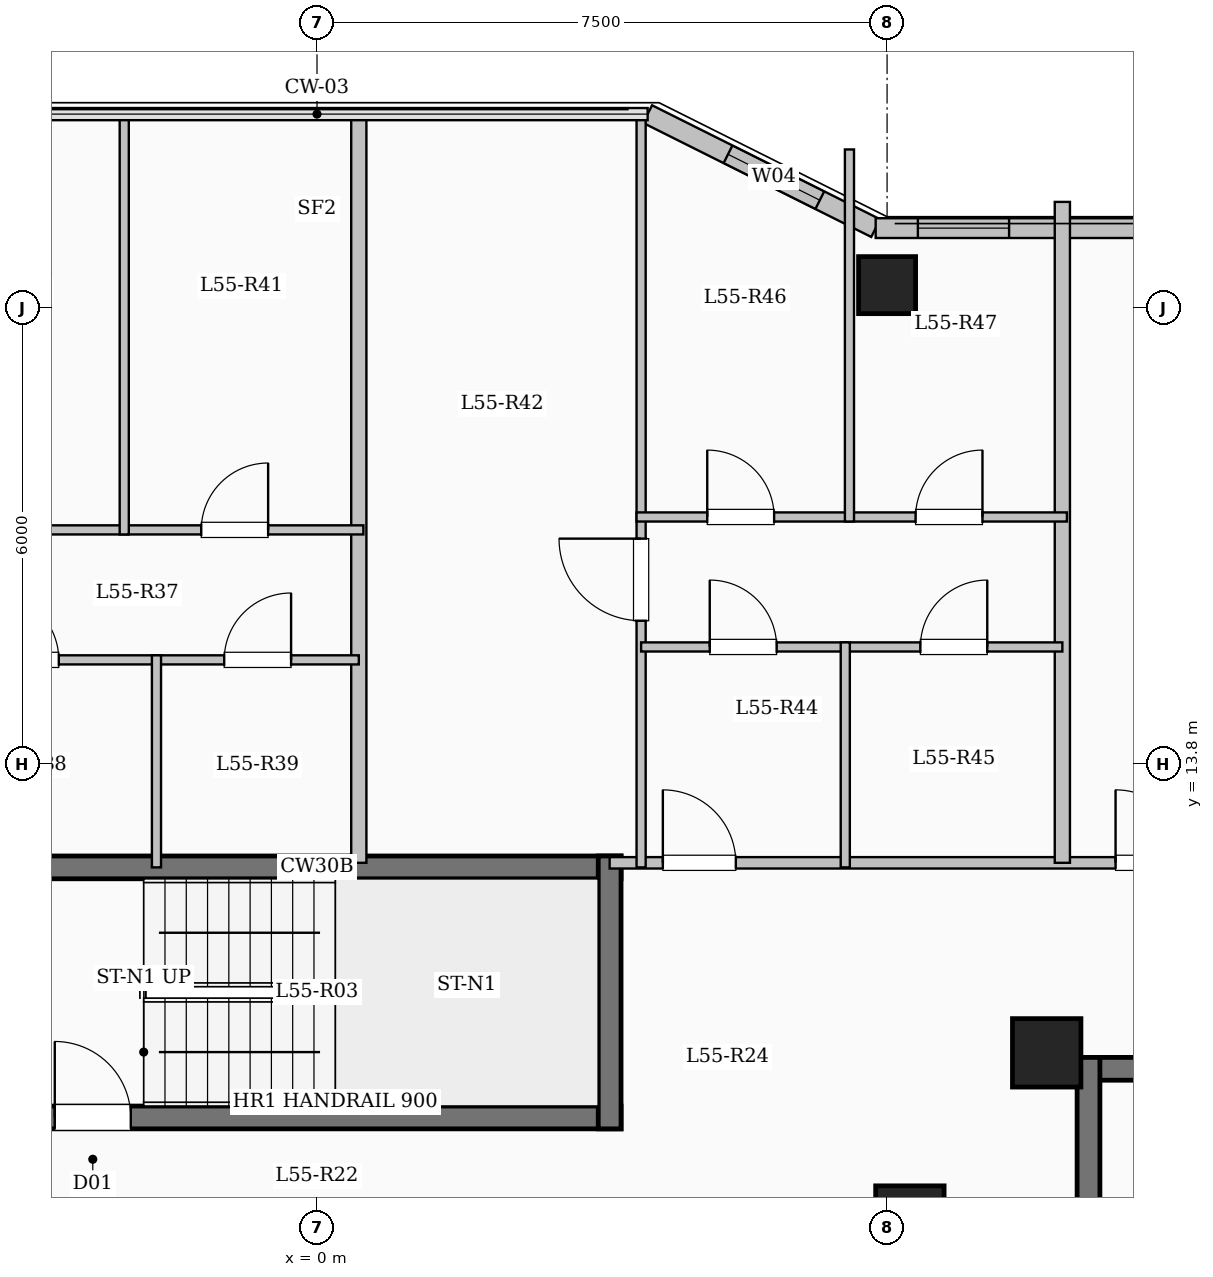
"""IFC4 building model, lengths in metres.
Left out: names, types, materials, properties, quantities, classifications, styles, units other than length and angle.
Written with IfcOpenShell. Run it as: python <this file> out.ifc"""

import sys

from ifc_helpers import new_model, si_unit, direction, frame, frame_2d, origin, origin_2d, place, context, subcontext, project, spatial, rectangle, extrude, element, fill, save


model = new_model("IFC4")
c1 = context("Model", 3, precision=1e-05, world=origin(), true_north=direction((0.0, 1.0)))
c2 = subcontext(c1, "Body", "Model", "MODEL_VIEW")
j1 = project(units=[si_unit("LENGTHUNIT", "METRE"), si_unit("PLANEANGLEUNIT", "RADIAN")], contexts=[c1])
p1 = place(None, origin())
s1 = spatial("IfcSite", under=j1, at=p1, CompositionType="ELEMENT")
p2 = place(p1, origin())
s2 = spatial("IfcBuilding", under=s1, at=p2, CompositionType="ELEMENT")
p3 = place(p2, frame((0.0, 0.0, 203.65)))
s3 = spatial("IfcBuildingStorey", under=s2, at=p3, CompositionType="ELEMENT", Elevation=203.65)
for number, where, z_axis, x_axis in (
    (1, (7.8, 7.8, 0.0), (0.0, 0.0, 1.0), (1.0, 0.0, 0.0)),
    (2, (9.6, 10.0, 0.0), (0.0, 0.0, 1.0), (1.0, 0.0, 0.0)),
):
    element("IfcColumn", number, at=place(p3, frame(where, z_axis=z_axis, x_axis=x_axis)), inside=s3, PredefinedType="COLUMN", context=c2, shape_type="SweptSolid", body=[
        extrude(rectangle(XDim=0.9, YDim=0.9, at=origin_2d()), origin(), (0.0, 0.0, 1.0), 3.35),
    ])
p4 = place(p3, frame((7.5, 20.1, 0.0), z_axis=(0.0, 0.0, 1.0), x_axis=(1.0, 0.0, 0.0)))
e3 = element("IfcColumn", 3, at=p4, inside=s3, PredefinedType="COLUMN", context=c2, shape_type="SweptSolid", body=[
    extrude(rectangle(XDim=0.75, YDim=0.75, at=origin_2d()), origin(), (0.0, 0.0, 1.0), 3.35),
])
p5 = place(p3, frame((4.35, 22.35, 0.0), z_axis=(0.0, 0.0, 1.0), x_axis=(0.894427191, -0.4472135955, 0.0)))
e4 = element("IfcWall", 4, at=p5, inside=s3, PredefinedType="SOLIDWALL", context=c2, shape_type="SweptSolid", body=[
    extrude(rectangle(XDim=3.354, YDim=0.26, at=frame_2d((1.677, 0.0))), origin(), (0.0, 0.0, 1.0), 3.1),
])
p6 = place(p5, frame((1.182, 0.0, 0.95)))
e5 = element("IfcOpeningElement", 5, at=p6, cuts=e4, PredefinedType="OPENING", context=c2, shape_type="SweptSolid", body=[
    extrude(rectangle(XDim=1.35, YDim=1.55, at=frame_2d((0.675, 0.775))), frame((0.0, 0.14, 0.0), z_axis=(0.0, -1.0, 0.0), x_axis=(1.0, 0.0, 0.0)), (0.0, 0.0, 1.0), 0.28),
])
p7 = place(p3, frame((7.35, 20.85, 0.0), z_axis=(0.0, 0.0, 1.0), x_axis=(1.0, 0.0, 0.0)))
e6 = element("IfcWall", 6, at=p7, inside=s3, PredefinedType="SOLIDWALL", context=c2, shape_type="SweptSolid", body=[
    extrude(rectangle(XDim=11.1, YDim=0.26, at=frame_2d((5.55, 0.0))), origin(), (0.0, 0.0, 1.0), 3.1),
])
p8 = place(p7, frame((0.555, 0.0, 0.95)))
e7 = element("IfcOpeningElement", 7, at=p8, cuts=e6, PredefinedType="OPENING", context=c2, shape_type="SweptSolid", body=[
    extrude(rectangle(XDim=1.2, YDim=1.5, at=frame_2d((0.6, 0.75))), frame((0.0, 0.14, 0.0), z_axis=(0.0, -1.0, 0.0), x_axis=(1.0, 0.0, 0.0)), (0.0, 0.0, 1.0), 0.28),
])
p9 = place(p7, frame((3.471, 0.0, 0.9)))
e8 = element("IfcOpeningElement", 8, at=p9, cuts=e6, PredefinedType="OPENING", context=c2, shape_type="SweptSolid", body=[
    extrude(rectangle(XDim=2.2, YDim=1.75, at=frame_2d((1.1, 0.875))), frame((0.0, 0.14, 0.0), z_axis=(0.0, -1.0, 0.0), x_axis=(1.0, 0.0, 0.0)), (0.0, 0.0, 1.0), 0.28),
])
p10 = place(p7, frame((8.04, 0.0, 0.9)))
e9 = element("IfcOpeningElement", 9, at=p10, cuts=e6, PredefinedType="OPENING", context=c2, shape_type="SweptSolid", body=[
    extrude(rectangle(XDim=1.65, YDim=1.6, at=frame_2d((0.825, 0.8))), frame((0.0, 0.14, 0.0), z_axis=(0.0, -1.0, 0.0), x_axis=(1.0, 0.0, 0.0)), (0.0, 0.0, 1.0), 0.28),
])
p11 = place(p3, frame((10.0, 9.79, 0.0), z_axis=(0.0, 0.0, 1.0), x_axis=(1.0, 0.0, 0.0)))
e10 = element("IfcWall", 10, at=p11, inside=s3, PredefinedType="SHEAR", context=c2, shape_type="SweptSolid", body=[
    extrude(rectangle(XDim=8.0, YDim=0.3, at=frame_2d((4.0, 0.0))), origin(), (0.0, 0.0, 1.0), 3.35),
])
p12 = place(p3, frame((10.15, 6.35, 0.0), z_axis=(0.0, 0.0, 1.0), x_axis=(0.0, 1.0, 0.0)))
e11 = element("IfcWall", 11, at=p12, inside=s3, PredefinedType="SHEAR", context=c2, shape_type="SweptSolid", body=[
    extrude(rectangle(XDim=3.59, YDim=0.3, at=frame_2d((1.795, 0.0))), origin(), (0.0, 0.0, 1.0), 3.35),
])
p13 = place(p3, frame((-4.0, 12.44, 0.0), z_axis=(0.0, 0.0, 1.0), x_axis=(1.0, 0.0, 0.0)))
e12 = element("IfcWall", 12, at=p13, inside=s3, PredefinedType="SHEAR", context=c2, shape_type="SweptSolid", body=[
    extrude(rectangle(XDim=8.0, YDim=0.3, at=frame_2d((4.0, 0.0))), origin(), (0.0, 0.0, 1.0), 3.35),
])
p14 = place(p3, frame((-4.0, 9.15, 0.0), z_axis=(0.0, 0.0, 1.0), x_axis=(1.0, 0.0, 0.0)))
e13 = element("IfcWall", 13, at=p14, inside=s3, PredefinedType="SHEAR", context=c2, shape_type="SweptSolid", body=[
    extrude(rectangle(XDim=8.0, YDim=0.3, at=frame_2d((4.0, 0.0))), origin(), (0.0, 0.0, 1.0), 3.35),
])
p15 = place(p14, frame((0.55, 0.0, 0.0)))
e14 = element("IfcOpeningElement", 14, at=p15, cuts=e13, PredefinedType="OPENING", context=c2, shape_type="SweptSolid", body=[
    extrude(rectangle(XDim=1.0, YDim=2.15, at=frame_2d((0.5, 1.075))), frame((0.0, 0.16, 0.0), z_axis=(0.0, -1.0, 0.0), x_axis=(1.0, 0.0, 0.0)), (0.0, 0.0, 1.0), 0.32),
])
p16 = place(p3, frame((3.85, 9.0, 0.0), z_axis=(0.0, 0.0, 1.0), x_axis=(0.0, 1.0, 0.0)))
e15 = element("IfcWall", 15, at=p16, inside=s3, PredefinedType="SHEAR", context=c2, shape_type="SweptSolid", body=[
    extrude(rectangle(XDim=3.59, YDim=0.3, at=frame_2d((1.795, 0.0))), origin(), (0.0, 0.0, 1.0), 3.35),
])
p17 = place(p3, frame((3.85, 12.5, 0.0), z_axis=(0.0, 0.0, 1.0), x_axis=(1.0, 0.0, 0.0)))
e16 = element("IfcWall", 16, at=p17, inside=s3, PredefinedType="PARTITIONING", context=c2, shape_type="SweptSolid", body=[
    extrude(rectangle(XDim=14.5, YDim=0.15, at=frame_2d((7.25, 0.0))), origin(), (0.0, 0.0, 1.0), 3.1),
])
p18 = place(p17, frame((0.7, 0.0, 0.0)))
e17 = element("IfcOpeningElement", 17, at=p18, cuts=e16, PredefinedType="OPENING", context=c2, shape_type="SweptSolid", body=[
    extrude(rectangle(XDim=0.96, YDim=2.15, at=frame_2d((0.48, 1.075))), frame((0.0, 0.085, 0.0), z_axis=(0.0, -1.0, 0.0), x_axis=(1.0, 0.0, 0.0)), (0.0, 0.0, 1.0), 0.17),
])
p19 = place(p17, frame((6.656, 0.0, 0.0)))
e18 = element("IfcOpeningElement", 18, at=p19, cuts=e16, PredefinedType="OPENING", context=c2, shape_type="SweptSolid", body=[
    extrude(rectangle(XDim=0.96, YDim=2.15, at=frame_2d((0.48, 1.075))), frame((0.0, 0.085, 0.0), z_axis=(0.0, -1.0, 0.0), x_axis=(1.0, 0.0, 0.0)), (0.0, 0.0, 1.0), 0.17),
])
p20 = place(p3, frame((0.55, 12.5, 0.0), z_axis=(0.0, 0.0, 1.0), x_axis=(0.0, 1.0, 0.0)))
e19 = element("IfcWall", 19, at=p20, inside=s3, PredefinedType="SOLIDWALL", context=c2, shape_type="SweptSolid", body=[
    extrude(rectangle(XDim=9.88, YDim=0.2, at=frame_2d((4.94, 0.0))), origin(), (0.0, 0.0, 1.0), 3.1),
])
p21 = place(p3, frame((-5.562, 15.17, 0.0), z_axis=(0.0, 0.0, 1.0), x_axis=(1.0, 0.0, 0.0)))
e20 = element("IfcWall", 20, at=p21, inside=s3, PredefinedType="PARTITIONING", context=c2, shape_type="SweptSolid", body=[
    extrude(rectangle(XDim=3.45, YDim=0.12, at=frame_2d((1.725, 0.0))), origin(), (0.0, 0.0, 1.0), 3.1),
])
p22 = place(p21, frame((1.285, 0.0, 0.0)))
e21 = element("IfcOpeningElement", 21, at=p22, cuts=e20, PredefinedType="OPENING", context=c2, shape_type="SweptSolid", body=[
    extrude(rectangle(XDim=0.88, YDim=2.1, at=frame_2d((0.44, 1.05))), frame((0.0, 0.07, 0.0), z_axis=(0.0, -1.0, 0.0), x_axis=(1.0, 0.0, 0.0)), (0.0, 0.0, 1.0), 0.14),
])
p23 = place(p3, frame((-2.112, 15.17, 0.0), z_axis=(0.0, 0.0, 1.0), x_axis=(1.0, 0.0, 0.0)))
e22 = element("IfcWall", 22, at=p23, inside=s3, PredefinedType="PARTITIONING", context=c2, shape_type="SweptSolid", body=[
    extrude(rectangle(XDim=2.662, YDim=0.12, at=frame_2d((1.331, 0.0))), origin(), (0.0, 0.0, 1.0), 3.1),
])
p24 = place(p23, frame((0.891, 0.0, 0.0)))
e23 = element("IfcOpeningElement", 23, at=p24, cuts=e22, PredefinedType="OPENING", context=c2, shape_type="SweptSolid", body=[
    extrude(rectangle(XDim=0.88, YDim=2.1, at=frame_2d((0.44, 1.05))), frame((0.0, 0.07, 0.0), z_axis=(0.0, -1.0, 0.0), x_axis=(1.0, 0.0, 0.0)), (0.0, 0.0, 1.0), 0.14),
])
p25 = place(p3, frame((-5.622, 16.88, 0.0), z_axis=(0.0, 0.0, 1.0), x_axis=(1.0, 0.0, 0.0)))
e24 = element("IfcWall", 24, at=p25, inside=s3, PredefinedType="PARTITIONING", context=c2, shape_type="SweptSolid", body=[
    extrude(rectangle(XDim=6.232, YDim=0.12, at=frame_2d((3.116, 0.0))), origin(), (0.0, 0.0, 1.0), 2.725),
])
p26 = place(p25, frame((1.073, 0.0, 0.0)))
e25 = element("IfcOpeningElement", 25, at=p26, cuts=e24, PredefinedType="OPENING", context=c2, shape_type="SweptSolid", body=[
    extrude(rectangle(XDim=0.88, YDim=2.1, at=frame_2d((0.44, 1.05))), frame((0.0, 0.07, 0.0), z_axis=(0.0, -1.0, 0.0), x_axis=(1.0, 0.0, 0.0)), (0.0, 0.0, 1.0), 0.14),
])
p27 = place(p25, frame((4.099, 0.0, 0.0)))
e26 = element("IfcOpeningElement", 26, at=p27, cuts=e24, PredefinedType="OPENING", context=c2, shape_type="SweptSolid", body=[
    extrude(rectangle(XDim=0.88, YDim=2.1, at=frame_2d((0.44, 1.05))), frame((0.0, 0.07, 0.0), z_axis=(0.0, -1.0, 0.0), x_axis=(1.0, 0.0, 0.0)), (0.0, 0.0, 1.0), 0.14),
])
p28 = place(p3, frame((-2.112, 12.44, 0.0), z_axis=(0.0, 0.0, 1.0), x_axis=(0.0, 1.0, 0.0)))
e27 = element("IfcWall", 27, at=p28, inside=s3, PredefinedType="PARTITIONING", context=c2, shape_type="SweptSolid", body=[
    extrude(rectangle(XDim=2.79, YDim=0.12, at=frame_2d((1.395, 0.0))), origin(), (0.0, 0.0, 1.0), 3.1),
])
p29 = place(p3, frame((-2.536, 16.82, 0.0), z_axis=(0.0, 0.0, 1.0), x_axis=(0.0, 1.0, 0.0)))
e28 = element("IfcWall", 28, at=p29, inside=s3, PredefinedType="PARTITIONING", context=c2, shape_type="SweptSolid", body=[
    extrude(rectangle(XDim=5.56, YDim=0.12, at=frame_2d((2.78, 0.0))), origin(), (0.0, 0.0, 1.0), 3.1),
])
p30 = place(p3, frame((9.806, 12.5, 0.0), z_axis=(0.0, 0.0, 1.0), x_axis=(0.0, 1.0, 0.0)))
e29 = element("IfcWall", 29, at=p30, inside=s3, PredefinedType="SOLIDWALL", context=c2, shape_type="SweptSolid", body=[
    extrude(rectangle(XDim=8.695, YDim=0.2, at=frame_2d((4.348, 0.0))), origin(), (0.0, 0.0, 1.0), 3.1),
])
p31 = place(p3, frame((4.264, 12.44, 0.0), z_axis=(0.0, 0.0, 1.0), x_axis=(0.0, 1.0, 0.0)))
e30 = element("IfcWall", 30, at=p31, inside=s3, PredefinedType="PARTITIONING", context=c2, shape_type="SweptSolid", body=[
    extrude(rectangle(XDim=9.94, YDim=0.12, at=frame_2d((4.97, 0.0))), origin(), (0.0, 0.0, 1.0), 3.1),
])
p32 = place(p31, frame((3.245, 0.0, 0.0)))
e31 = element("IfcOpeningElement", 31, at=p32, cuts=e30, PredefinedType="OPENING", context=c2, shape_type="SweptSolid", body=[
    extrude(rectangle(XDim=1.08, YDim=2.15, at=frame_2d((0.54, 1.075))), frame((0.0, 0.07, 0.0), z_axis=(0.0, -1.0, 0.0), x_axis=(1.0, 0.0, 0.0)), (0.0, 0.0, 1.0), 0.14),
])
p33 = place(p3, frame((4.264, 15.34, 0.0), z_axis=(0.0, 0.0, 1.0), x_axis=(1.0, 0.0, 0.0)))
e32 = element("IfcWall", 32, at=p33, inside=s3, PredefinedType="PARTITIONING", context=c2, shape_type="SweptSolid", body=[
    extrude(rectangle(XDim=2.686, YDim=0.12, at=frame_2d((1.343, 0.0))), origin(), (0.0, 0.0, 1.0), 2.725),
])
p34 = place(p33, frame((0.903, 0.0, 0.0)))
e33 = element("IfcOpeningElement", 33, at=p34, cuts=e32, PredefinedType="OPENING", context=c2, shape_type="SweptSolid", body=[
    extrude(rectangle(XDim=0.88, YDim=2.1, at=frame_2d((0.44, 1.05))), frame((0.0, 0.07, 0.0), z_axis=(0.0, -1.0, 0.0), x_axis=(1.0, 0.0, 0.0)), (0.0, 0.0, 1.0), 0.14),
])
p35 = place(p3, frame((6.95, 15.34, 0.0), z_axis=(0.0, 0.0, 1.0), x_axis=(1.0, 0.0, 0.0)))
e34 = element("IfcWall", 34, at=p35, inside=s3, PredefinedType="PARTITIONING", context=c2, shape_type="SweptSolid", body=[
    extrude(rectangle(XDim=2.856, YDim=0.12, at=frame_2d((1.428, 0.0))), origin(), (0.0, 0.0, 1.0), 2.725),
])
p36 = place(p35, frame((0.988, 0.0, 0.0)))
e35 = element("IfcOpeningElement", 35, at=p36, cuts=e34, PredefinedType="OPENING", context=c2, shape_type="SweptSolid", body=[
    extrude(rectangle(XDim=0.88, YDim=2.1, at=frame_2d((0.44, 1.05))), frame((0.0, 0.07, 0.0), z_axis=(0.0, -1.0, 0.0), x_axis=(1.0, 0.0, 0.0)), (0.0, 0.0, 1.0), 0.14),
])
p37 = place(p3, frame((4.204, 17.05, 0.0), z_axis=(0.0, 0.0, 1.0), x_axis=(1.0, 0.0, 0.0)))
e36 = element("IfcWall", 36, at=p37, inside=s3, PredefinedType="PARTITIONING", context=c2, shape_type="SweptSolid", body=[
    extrude(rectangle(XDim=5.662, YDim=0.12, at=frame_2d((2.831, 0.0))), origin(), (0.0, 0.0, 1.0), 2.725),
])
p38 = place(p37, frame((0.93, 0.0, 0.0)))
e37 = element("IfcOpeningElement", 37, at=p38, cuts=e36, PredefinedType="OPENING", context=c2, shape_type="SweptSolid", body=[
    extrude(rectangle(XDim=0.88, YDim=2.1, at=frame_2d((0.44, 1.05))), frame((0.0, 0.07, 0.0), z_axis=(0.0, -1.0, 0.0), x_axis=(1.0, 0.0, 0.0)), (0.0, 0.0, 1.0), 0.14),
])
p39 = place(p37, frame((3.671, 0.0, 0.0)))
e38 = element("IfcOpeningElement", 38, at=p39, cuts=e36, PredefinedType="OPENING", context=c2, shape_type="SweptSolid", body=[
    extrude(rectangle(XDim=0.88, YDim=2.1, at=frame_2d((0.44, 1.05))), frame((0.0, 0.07, 0.0), z_axis=(0.0, -1.0, 0.0), x_axis=(1.0, 0.0, 0.0)), (0.0, 0.0, 1.0), 0.14),
])
p40 = place(p3, frame((6.95, 12.44, 0.0), z_axis=(0.0, 0.0, 1.0), x_axis=(0.0, 1.0, 0.0)))
e39 = element("IfcWall", 39, at=p40, inside=s3, PredefinedType="PARTITIONING", context=c2, shape_type="SweptSolid", body=[
    extrude(rectangle(XDim=2.96, YDim=0.12, at=frame_2d((1.48, 0.0))), origin(), (0.0, 0.0, 1.0), 3.1),
])
p41 = place(p3, frame((7.005, 16.99, 0.0), z_axis=(0.0, 0.0, 1.0), x_axis=(0.0, 1.0, 0.0)))
e40 = element("IfcWall", 40, at=p41, inside=s3, PredefinedType="PARTITIONING", context=c2, shape_type="SweptSolid", body=[
    extrude(rectangle(XDim=4.895, YDim=0.12, at=frame_2d((2.448, 0.0))), origin(), (0.0, 0.0, 1.0), 3.1),
])
p42 = place(p6, origin())
e41 = element("IfcWindow", 41, at=p42, inside=s3, PartitioningType="SINGLE_PANEL", PredefinedType="WINDOW", context=c2, shape_type="SweptSolid", body=[
    extrude(rectangle(XDim=1.35, YDim=1.55, at=frame_2d((0.675, 0.775))), frame((0.0, 0.03, 0.0), z_axis=(0.0, -1.0, 0.0), x_axis=(1.0, 0.0, 0.0)), (0.0, 0.0, 1.0), 0.06),
])
fill(e5, e41)
p43 = place(p8, origin())
e42 = element("IfcWindow", 42, at=p43, inside=s3, PartitioningType="SINGLE_PANEL", PredefinedType="WINDOW", context=c2, shape_type="SweptSolid", body=[
    extrude(rectangle(XDim=1.2, YDim=1.5, at=frame_2d((0.6, 0.75))), frame((0.0, 0.03, 0.0), z_axis=(0.0, -1.0, 0.0), x_axis=(1.0, 0.0, 0.0)), (0.0, 0.0, 1.0), 0.06),
])
fill(e7, e42)
p44 = place(p15, origin())
e43 = element("IfcDoor", 43, at=p44, inside=s3, OperationType="SINGLE_SWING_LEFT", PredefinedType="DOOR", context=c2, shape_type="SweptSolid", body=[
    extrude(rectangle(XDim=1.0, YDim=2.15, at=frame_2d((0.5, 1.075))), frame((0.0, 0.025, 0.0), z_axis=(0.0, -1.0, 0.0), x_axis=(1.0, 0.0, 0.0)), (0.0, 0.0, 1.0), 0.05),
])
fill(e14, e43)
p45 = place(p22, origin())
e44 = element("IfcDoor", 44, at=p45, inside=s3, OperationType="SINGLE_SWING_LEFT", PredefinedType="DOOR", context=c2, shape_type="SweptSolid", body=[
    extrude(rectangle(XDim=0.88, YDim=2.1, at=frame_2d((0.44, 1.05))), frame((0.0, 0.025, 0.0), z_axis=(0.0, -1.0, 0.0), x_axis=(1.0, 0.0, 0.0)), (0.0, 0.0, 1.0), 0.05),
])
fill(e21, e44)
p46 = place(p24, origin())
e45 = element("IfcDoor", 45, at=p46, inside=s3, OperationType="SINGLE_SWING_RIGHT", PredefinedType="DOOR", context=c2, shape_type="SweptSolid", body=[
    extrude(rectangle(XDim=0.88, YDim=2.1, at=frame_2d((0.44, 1.05))), frame((0.0, 0.025, 0.0), z_axis=(0.0, -1.0, 0.0), x_axis=(1.0, 0.0, 0.0)), (0.0, 0.0, 1.0), 0.05),
])
fill(e23, e45)
p47 = place(p27, origin())
e46 = element("IfcDoor", 46, at=p47, inside=s3, OperationType="SINGLE_SWING_RIGHT", PredefinedType="DOOR", context=c2, shape_type="SweptSolid", body=[
    extrude(rectangle(XDim=0.88, YDim=2.1, at=frame_2d((0.44, 1.05))), frame((0.0, 0.025, 0.0), z_axis=(0.0, -1.0, 0.0), x_axis=(1.0, 0.0, 0.0)), (0.0, 0.0, 1.0), 0.05),
])
fill(e26, e46)
p48 = place(p18, origin())
e47 = element("IfcDoor", 47, at=p48, inside=s3, OperationType="SINGLE_SWING_LEFT", PredefinedType="DOOR", context=c2, shape_type="SweptSolid", body=[
    extrude(rectangle(XDim=0.96, YDim=2.15, at=frame_2d((0.48, 1.075))), frame((0.0, 0.025, 0.0), z_axis=(0.0, -1.0, 0.0), x_axis=(1.0, 0.0, 0.0)), (0.0, 0.0, 1.0), 0.05),
])
fill(e17, e47)
p49 = place(p32, origin())
e48 = element("IfcDoor", 48, at=p49, inside=s3, OperationType="SINGLE_SWING_RIGHT", PredefinedType="DOOR", context=c2, shape_type="SweptSolid", body=[
    extrude(rectangle(XDim=1.08, YDim=2.15, at=frame_2d((0.54, 1.075))), frame((0.0, 0.025, 0.0), z_axis=(0.0, -1.0, 0.0), x_axis=(1.0, 0.0, 0.0)), (0.0, 0.0, 1.0), 0.05),
])
fill(e31, e48)
p50 = place(p34, origin())
e49 = element("IfcDoor", 49, at=p50, inside=s3, OperationType="SINGLE_SWING_LEFT", PredefinedType="DOOR", context=c2, shape_type="SweptSolid", body=[
    extrude(rectangle(XDim=0.88, YDim=2.1, at=frame_2d((0.44, 1.05))), frame((0.0, 0.025, 0.0), z_axis=(0.0, -1.0, 0.0), x_axis=(1.0, 0.0, 0.0)), (0.0, 0.0, 1.0), 0.05),
])
fill(e33, e49)
p51 = place(p36, origin())
e50 = element("IfcDoor", 50, at=p51, inside=s3, OperationType="SINGLE_SWING_RIGHT", PredefinedType="DOOR", context=c2, shape_type="SweptSolid", body=[
    extrude(rectangle(XDim=0.88, YDim=2.1, at=frame_2d((0.44, 1.05))), frame((0.0, 0.025, 0.0), z_axis=(0.0, -1.0, 0.0), x_axis=(1.0, 0.0, 0.0)), (0.0, 0.0, 1.0), 0.05),
])
fill(e35, e50)
p52 = place(p38, origin())
e51 = element("IfcDoor", 51, at=p52, inside=s3, OperationType="SINGLE_SWING_LEFT", PredefinedType="DOOR", context=c2, shape_type="SweptSolid", body=[
    extrude(rectangle(XDim=0.88, YDim=2.1, at=frame_2d((0.44, 1.05))), frame((0.0, 0.025, 0.0), z_axis=(0.0, -1.0, 0.0), x_axis=(1.0, 0.0, 0.0)), (0.0, 0.0, 1.0), 0.05),
])
fill(e37, e51)
p53 = place(p39, origin())
e52 = element("IfcDoor", 52, at=p53, inside=s3, OperationType="SINGLE_SWING_RIGHT", PredefinedType="DOOR", context=c2, shape_type="SweptSolid", body=[
    extrude(rectangle(XDim=0.88, YDim=2.1, at=frame_2d((0.44, 1.05))), frame((0.0, 0.025, 0.0), z_axis=(0.0, -1.0, 0.0), x_axis=(1.0, 0.0, 0.0)), (0.0, 0.0, 1.0), 0.05),
])
fill(e38, e52)
p54 = place(p19, origin())
e53 = element("IfcDoor", 53, at=p54, inside=s3, OperationType="SINGLE_SWING_LEFT", PredefinedType="DOOR", context=c2, shape_type="SweptSolid", body=[
    extrude(rectangle(XDim=0.96, YDim=2.15, at=frame_2d((0.48, 1.075))), frame((0.0, 0.025, 0.0), z_axis=(0.0, -1.0, 0.0), x_axis=(1.0, 0.0, 0.0)), (0.0, 0.0, 1.0), 0.05),
])
fill(e18, e53)
save(model, sys.argv[1])
